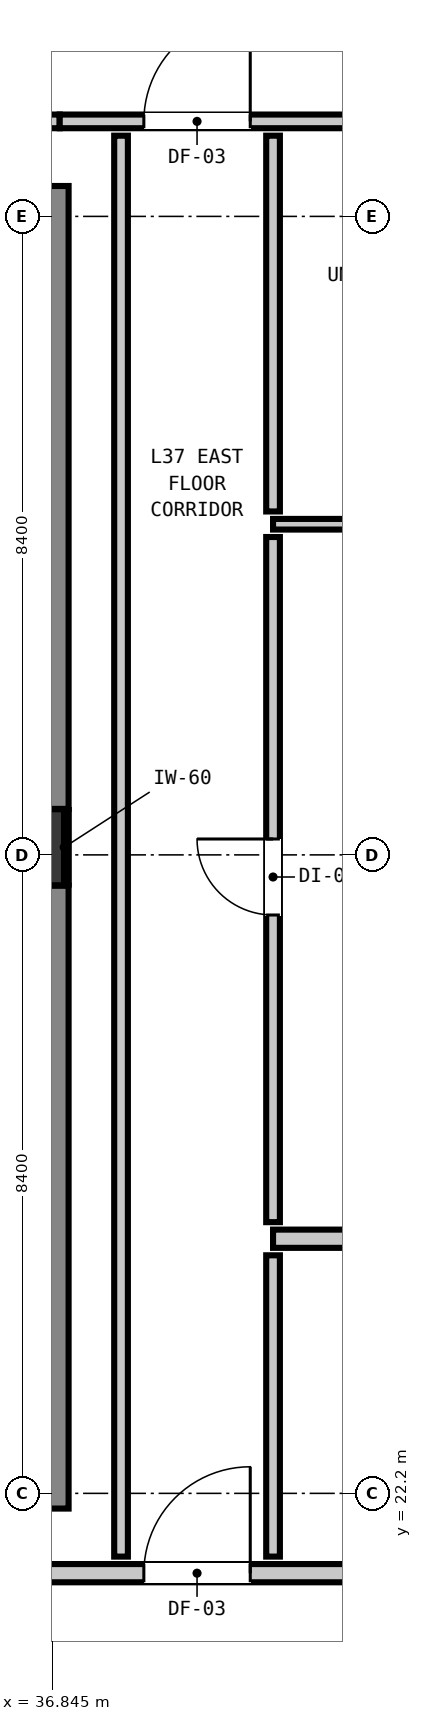
"""IFC4 building model, lengths in metres.
Left out: names, types, materials, properties, quantities, classifications, styles, units other than length and angle.
Written with IfcOpenShell. Run it as: python <this file> out.ifc"""

import sys

from ifc_helpers import new_model, si_unit, direction, frame, frame_2d, origin, origin_2d, place, context, subcontext, project, spatial, rectangle, extrude, element, fill, save


model = new_model("IFC4")
c1 = context("Model", 3, precision=1e-05, world=origin(), true_north=direction((0.0, 1.0)))
c2 = subcontext(c1, "Body", "Model", "MODEL_VIEW")
j1 = project(units=[si_unit("LENGTHUNIT", "METRE"), si_unit("PLANEANGLEUNIT", "RADIAN")], contexts=[c1])
p1 = place(None, origin())
s1 = spatial("IfcSite", under=j1, at=p1, CompositionType="ELEMENT")
p2 = place(p1, origin())
s2 = spatial("IfcBuilding", under=s1, at=p2, CompositionType="ELEMENT")
p3 = place(p2, frame((0.0, 0.0, 129.32)))
s3 = spatial("IfcBuildingStorey", under=s2, at=p3, CompositionType="ELEMENT", Elevation=129.32)
p4 = place(p3, frame((36.5, 30.7, 0.0), z_axis=(0.0, 0.0, 1.0), x_axis=(1.0, 0.0, 0.0)))
e1 = element("IfcColumn", 1, at=p4, inside=s3, PredefinedType="COLUMN", context=c2, shape_type="SweptSolid", body=[
    extrude(rectangle(XDim=1.0, YDim=1.0, at=origin_2d()), origin(), (0.0, 0.0, 1.0), 3.32),
])
p5 = place(p3, frame((36.56, 22.0, 0.0), z_axis=(0.0, 0.0, 1.0), x_axis=(0.0, 1.0, 0.0)))
e2 = element("IfcWall", 2, at=p5, inside=s3, PredefinedType="SHEAR", context=c2, shape_type="SweptSolid", body=[
    extrude(rectangle(XDim=8.195, YDim=1.0, at=frame_2d((4.098, 0.0))), origin(), (0.0, 0.0, 1.0), 3.32),
])
p6 = place(p3, frame((36.56, 31.205, 0.0), z_axis=(0.0, 0.0, 1.0), x_axis=(0.0, 1.0, 0.0)))
e3 = element("IfcWall", 3, at=p6, inside=s3, PredefinedType="SHEAR", context=c2, shape_type="SweptSolid", body=[
    extrude(rectangle(XDim=8.195, YDim=1.0, at=frame_2d((4.097, 0.0))), origin(), (0.0, 0.0, 1.0), 3.32),
])
p7 = place(p3, frame((9.407, 21.15, 0.0), z_axis=(0.0, 0.0, 1.0), x_axis=(1.0, 0.0, 0.0)))
e4 = element("IfcWall", 4, at=p7, inside=s3, PredefinedType="PARTITIONING", context=c2, shape_type="SweptSolid", body=[
    extrude(rectangle(XDim=39.386, YDim=0.24, at=frame_2d((19.693, 0.0))), origin(), (0.0, 0.0, 1.0), 3.08),
])
p8 = place(p7, frame((8.803, 0.0, 0.0)))
e5 = element("IfcOpeningElement", 5, at=p8, cuts=e4, PredefinedType="OPENING", context=c2, shape_type="SweptSolid", body=[
    extrude(rectangle(XDim=1.1, YDim=2.15, at=frame_2d((0.55, 1.075))), frame((0.0, 0.13, 0.0), z_axis=(0.0, -1.0, 0.0), x_axis=(1.0, 0.0, 0.0)), (0.0, 0.0, 1.0), 0.26),
])
p9 = place(p7, frame((1.192, 0.0, 0.0)))
e6 = element("IfcOpeningElement", 6, at=p9, cuts=e4, PredefinedType="OPENING", context=c2, shape_type="SweptSolid", body=[
    extrude(rectangle(XDim=1.4, YDim=2.15, at=frame_2d((0.7, 1.075))), frame((0.0, 0.13, 0.0), z_axis=(0.0, -1.0, 0.0), x_axis=(1.0, 0.0, 0.0)), (0.0, 0.0, 1.0), 0.26),
])
p10 = place(p7, frame((28.643, 0.0, 0.0)))
e7 = element("IfcOpeningElement", 7, at=p10, cuts=e4, PredefinedType="OPENING", context=c2, shape_type="SweptSolid", body=[
    extrude(rectangle(XDim=1.4, YDim=2.15, at=frame_2d((0.7, 1.075))), frame((0.0, 0.13, 0.0), z_axis=(0.0, -1.0, 0.0), x_axis=(1.0, 0.0, 0.0)), (0.0, 0.0, 1.0), 0.26),
])
p11 = place(p3, frame((39.75, 25.55, 0.0), z_axis=(0.0, 0.0, 1.0), x_axis=(1.0, 0.0, 0.0)))
e8 = element("IfcWall", 8, at=p11, inside=s3, PredefinedType="PARTITIONING", context=c2, shape_type="SweptSolid", body=[
    extrude(rectangle(XDim=9.043, YDim=0.24, at=frame_2d((4.521, 0.0))), origin(), (0.0, 0.0, 1.0), 3.08),
])
p12 = place(p11, frame((4.075, 0.0, 0.0)))
e9 = element("IfcOpeningElement", 9, at=p12, cuts=e8, PredefinedType="OPENING", context=c2, shape_type="SweptSolid", body=[
    extrude(rectangle(XDim=0.9, YDim=2.1, at=frame_2d((0.45, 1.05))), frame((0.0, 0.13, 0.0), z_axis=(0.0, -1.0, 0.0), x_axis=(1.0, 0.0, 0.0)), (0.0, 0.0, 1.0), 0.26),
])
p13 = place(p3, frame((9.407, 40.25, 0.0), z_axis=(0.0, 0.0, 1.0), x_axis=(1.0, 0.0, 0.0)))
e10 = element("IfcWall", 10, at=p13, inside=s3, PredefinedType="PARTITIONING", context=c2, shape_type="SweptSolid", body=[
    extrude(rectangle(XDim=27.536, YDim=0.18, at=frame_2d((13.768, 0.0))), origin(), (0.0, 0.0, 1.0), 3.08),
])
p14 = place(p13, frame((8.028, 0.0, 0.0)))
e11 = element("IfcOpeningElement", 11, at=p14, cuts=e10, PredefinedType="OPENING", context=c2, shape_type="SweptSolid", body=[
    extrude(rectangle(XDim=1.4, YDim=2.15, at=frame_2d((0.7, 1.075))), frame((0.0, 0.1, 0.0), z_axis=(0.0, -1.0, 0.0), x_axis=(1.0, 0.0, 0.0)), (0.0, 0.0, 1.0), 0.2),
])
p15 = place(p13, frame((1.192, 0.0, 0.0)))
e12 = element("IfcOpeningElement", 12, at=p15, cuts=e10, PredefinedType="OPENING", context=c2, shape_type="SweptSolid", body=[
    extrude(rectangle(XDim=1.4, YDim=2.15, at=frame_2d((0.7, 1.075))), frame((0.0, 0.1, 0.0), z_axis=(0.0, -1.0, 0.0), x_axis=(1.0, 0.0, 0.0)), (0.0, 0.0, 1.0), 0.2),
])
p16 = place(p3, frame((36.943, 40.25, 0.0), z_axis=(0.0, 0.0, 1.0), x_axis=(1.0, 0.0, 0.0)))
e13 = element("IfcWall", 13, at=p16, inside=s3, PredefinedType="PARTITIONING", context=c2, shape_type="SweptSolid", body=[
    extrude(rectangle(XDim=10.964, YDim=0.18, at=frame_2d((5.482, 0.0))), origin(), (0.0, 0.0, 1.0), 2.565),
])
p17 = place(p16, frame((1.107, 0.0, 0.0)))
e14 = element("IfcOpeningElement", 14, at=p17, cuts=e13, PredefinedType="OPENING", context=c2, shape_type="SweptSolid", body=[
    extrude(rectangle(XDim=1.4, YDim=2.15, at=frame_2d((0.7, 1.075))), frame((0.0, 0.1, 0.0), z_axis=(0.0, -1.0, 0.0), x_axis=(1.0, 0.0, 0.0)), (0.0, 0.0, 1.0), 0.2),
])
p18 = place(p3, frame((39.75, 34.95, 0.0), z_axis=(0.0, 0.0, 1.0), x_axis=(1.0, 0.0, 0.0)))
e15 = element("IfcWall", 15, at=p18, inside=s3, PredefinedType="PARTITIONING", context=c2, shape_type="SweptSolid", body=[
    extrude(rectangle(XDim=9.043, YDim=0.14, at=frame_2d((4.521, 0.0))), origin(), (0.0, 0.0, 1.0), 3.08),
])
p19 = place(p18, frame((1.708, 0.0, 0.0)))
e16 = element("IfcOpeningElement", 16, at=p19, cuts=e15, PredefinedType="OPENING", context=c2, shape_type="SweptSolid", body=[
    extrude(rectangle(XDim=0.86, YDim=2.02, at=frame_2d((0.43, 1.01))), frame((0.0, 0.08, 0.0), z_axis=(0.0, -1.0, 0.0), x_axis=(1.0, 0.0, 0.0)), (0.0, 0.0, 1.0), 0.16),
])
p20 = place(p18, frame((6.187, 0.0, 0.0)))
e17 = element("IfcOpeningElement", 17, at=p20, cuts=e15, PredefinedType="OPENING", context=c2, shape_type="SweptSolid", body=[
    extrude(rectangle(XDim=0.9, YDim=2.1, at=frame_2d((0.45, 1.05))), frame((0.0, 0.08, 0.0), z_axis=(0.0, -1.0, 0.0), x_axis=(1.0, 0.0, 0.0)), (0.0, 0.0, 1.0), 0.16),
])
p21 = place(p3, frame((37.75, 21.368, 0.0), z_axis=(0.0, 0.0, 1.0), x_axis=(0.0, 1.0, 0.0)))
e18 = element("IfcWall", 18, at=p21, inside=s3, PredefinedType="PARTITIONING", context=c2, shape_type="SweptSolid", body=[
    extrude(rectangle(XDim=18.694, YDim=0.18, at=frame_2d((9.347, 0.0))), origin(), (0.0, 0.0, 1.0), 3.08),
])
p22 = place(p3, frame((39.75, 21.368, 0.0), z_axis=(0.0, 0.0, 1.0), x_axis=(0.0, 1.0, 0.0)))
e19 = element("IfcWall", 19, at=p22, inside=s3, PredefinedType="PARTITIONING", context=c2, shape_type="SweptSolid", body=[
    extrude(rectangle(XDim=3.964, YDim=0.18, at=frame_2d((1.982, 0.0))), origin(), (0.0, 0.0, 1.0), 3.08),
])
p23 = place(p3, frame((39.75, 25.768, 0.0), z_axis=(0.0, 0.0, 1.0), x_axis=(0.0, 1.0, 0.0)))
e20 = element("IfcWall", 20, at=p23, inside=s3, PredefinedType="PARTITIONING", context=c2, shape_type="SweptSolid", body=[
    extrude(rectangle(XDim=9.014, YDim=0.18, at=frame_2d((4.507, 0.0))), origin(), (0.0, 0.0, 1.0), 3.08),
])
p24 = place(p23, frame((4.041, 0.0, 0.0)))
e21 = element("IfcOpeningElement", 21, at=p24, cuts=e20, PredefinedType="OPENING", context=c2, shape_type="SweptSolid", body=[
    extrude(rectangle(XDim=1.0, YDim=2.15, at=frame_2d((0.5, 1.075))), frame((0.0, 0.1, 0.0), z_axis=(0.0, -1.0, 0.0), x_axis=(1.0, 0.0, 0.0)), (0.0, 0.0, 1.0), 0.2),
])
p25 = place(p3, frame((39.75, 35.118, 0.0), z_axis=(0.0, 0.0, 1.0), x_axis=(0.0, 1.0, 0.0)))
e22 = element("IfcWall", 22, at=p25, inside=s3, PredefinedType="PARTITIONING", context=c2, shape_type="SweptSolid", body=[
    extrude(rectangle(XDim=4.944, YDim=0.18, at=frame_2d((2.472, 0.0))), origin(), (0.0, 0.0, 1.0), 3.08),
])
p26 = place(p3, frame((37.032, 30.21, 0.0), z_axis=(0.0, 0.0, 1.0), x_axis=(0.0, 1.0, 0.0)))
e23 = element("IfcWall", 23, at=p26, inside=s3, PredefinedType="PARTITIONING", context=c2, shape_type="SweptSolid", body=[
    extrude(rectangle(XDim=0.98, YDim=0.06, at=frame_2d((0.49, 0.0))), origin(), (0.0, 0.0, 1.0), 1.45),
])
p27 = place(p10, origin())
e24 = element("IfcDoor", 24, at=p27, inside=s3, OperationType="SINGLE_SWING_RIGHT", PredefinedType="DOOR", context=c2, shape_type="SweptSolid", body=[
    extrude(rectangle(XDim=1.4, YDim=2.15, at=frame_2d((0.7, 1.075))), frame((0.0, 0.025, 0.0), z_axis=(0.0, -1.0, 0.0), x_axis=(1.0, 0.0, 0.0)), (0.0, 0.0, 1.0), 0.05),
])
fill(e7, e24)
p28 = place(p17, origin())
e25 = element("IfcDoor", 25, at=p28, inside=s3, OperationType="SINGLE_SWING_RIGHT", PredefinedType="DOOR", context=c2, shape_type="SweptSolid", body=[
    extrude(rectangle(XDim=1.4, YDim=2.15, at=frame_2d((0.7, 1.075))), frame((0.0, 0.025, 0.0), z_axis=(0.0, -1.0, 0.0), x_axis=(1.0, 0.0, 0.0)), (0.0, 0.0, 1.0), 0.05),
])
fill(e14, e25)
p29 = place(p24, origin())
e26 = element("IfcDoor", 26, at=p29, inside=s3, OperationType="SINGLE_SWING_RIGHT", PredefinedType="DOOR", context=c2, shape_type="SweptSolid", body=[
    extrude(rectangle(XDim=1.0, YDim=2.15, at=frame_2d((0.5, 1.075))), frame((0.0, 0.025, 0.0), z_axis=(0.0, -1.0, 0.0), x_axis=(1.0, 0.0, 0.0)), (0.0, 0.0, 1.0), 0.05),
])
fill(e21, e26)
save(model, sys.argv[1])
